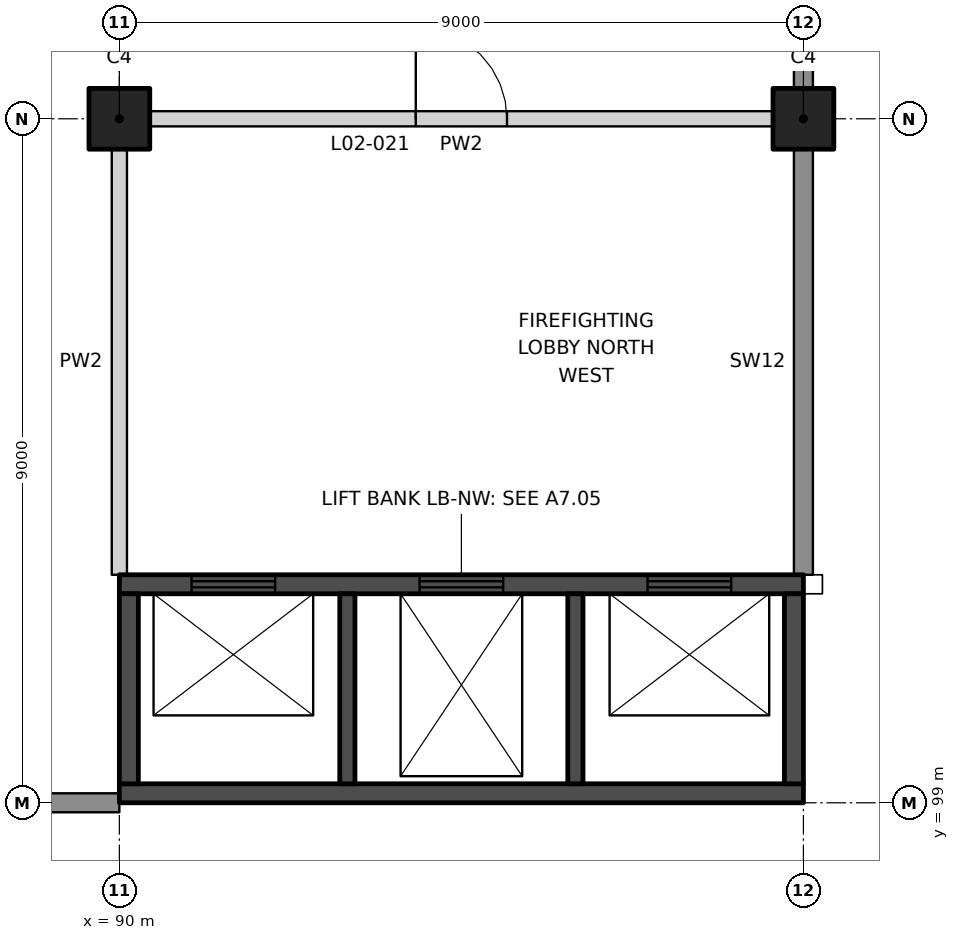
"""IFC4 building model, lengths in metres.
Left out: names, types, materials, properties, quantities, classifications, styles, units other than length and angle.
Written with IfcOpenShell. Run it as: python <this file> out.ifc"""

import sys

from ifc_helpers import new_model, si_unit, direction, frame, frame_2d, origin, origin_2d, place, context, subcontext, project, spatial, rectangle, extrude, element, fill, save


model = new_model("IFC4")
c1 = context("Model", 3, precision=1e-05, world=origin(), true_north=direction((0.0, 1.0)))
c2 = subcontext(c1, "Body", "Model", "MODEL_VIEW")
j1 = project(units=[si_unit("LENGTHUNIT", "METRE"), si_unit("PLANEANGLEUNIT", "RADIAN")], contexts=[c1])
p1 = place(None, origin())
s1 = spatial("IfcSite", under=j1, at=p1, CompositionType="ELEMENT")
p2 = place(p1, origin())
s2 = spatial("IfcBuilding", under=s1, at=p2, CompositionType="ELEMENT")
p3 = place(p2, frame((0.0, 0.0, 11.5)))
s3 = spatial("IfcBuildingStorey", under=s2, at=p3, CompositionType="ELEMENT", Elevation=11.5)
for number, where, z_axis, x_axis in (
    (1, (90.0, 108.0, 0.0), (0.0, 0.0, 1.0), (1.0, 0.0, 0.0)),
    (2, (99.0, 108.0, 0.0), (0.0, 0.0, 1.0), (1.0, 0.0, 0.0)),
):
    element("IfcColumn", number, at=place(p3, frame(where, z_axis=z_axis, x_axis=x_axis)), inside=s3, PredefinedType="COLUMN", context=c2, shape_type="SweptSolid", body=[
        extrude(rectangle(XDim=0.8, YDim=0.8, at=origin_2d()), origin(), (0.0, 0.0, 1.0), 10.5),
    ])
p4 = place(p3, frame((90.4, 108.0, 0.0), z_axis=(0.0, 0.0, 1.0), x_axis=(1.0, 0.0, 0.0)))
e3 = element("IfcWall", 3, at=p4, inside=s3, PredefinedType="PARTITIONING", context=c2, shape_type="SweptSolid", body=[
    extrude(rectangle(XDim=8.2, YDim=0.2, at=frame_2d((4.1, 0.0))), origin(), (0.0, 0.0, 1.0), 9.25),
])
p5 = place(p4, frame((3.5, 0.0, 0.0)))
e4 = element("IfcOpeningElement", 4, at=p5, cuts=e3, PredefinedType="OPENING", context=c2, shape_type="SweptSolid", body=[
    extrude(rectangle(XDim=1.2, YDim=2.1, at=frame_2d((0.6, 1.05))), frame((0.0, 0.11, 0.0), z_axis=(0.0, -1.0, 0.0), x_axis=(1.0, 0.0, 0.0)), (0.0, 0.0, 1.0), 0.22),
])
p6 = place(p3, frame((90.0, 102.0, 0.0), z_axis=(0.0, 0.0, 1.0), x_axis=(0.0, 1.0, 0.0)))
e5 = element("IfcWall", 5, at=p6, inside=s3, PredefinedType="PARTITIONING", context=c2, shape_type="SweptSolid", body=[
    extrude(rectangle(XDim=5.6, YDim=0.2, at=frame_2d((2.8, 0.0))), origin(), (0.0, 0.0, 1.0), 9.45),
])
p7 = place(p3, frame((90.0, 101.875, 0.0), z_axis=(0.0, 0.0, 1.0), x_axis=(1.0, 0.0, 0.0)))
e6 = element("IfcWall", 6, at=p7, inside=s3, PredefinedType="SHEAR", context=c2, shape_type="SweptSolid", body=[
    extrude(rectangle(XDim=9.0, YDim=0.25, at=frame_2d((4.5, 0.0))), origin(), (0.0, 0.0, 1.0), 10.5),
])
p8 = place(p7, frame((0.95, 0.0, 0.0)))
e7 = element("IfcOpeningElement", 7, at=p8, cuts=e6, PredefinedType="OPENING", context=c2, shape_type="SweptSolid", body=[
    extrude(rectangle(XDim=1.1, YDim=2.1, at=frame_2d((0.55, 1.05))), frame((0.0, 0.135, 0.0), z_axis=(0.0, -1.0, 0.0), x_axis=(1.0, 0.0, 0.0)), (0.0, 0.0, 1.0), 0.27),
])
p9 = place(p7, frame((3.95, 0.0, 0.0)))
e8 = element("IfcOpeningElement", 8, at=p9, cuts=e6, PredefinedType="OPENING", context=c2, shape_type="SweptSolid", body=[
    extrude(rectangle(XDim=1.1, YDim=2.1, at=frame_2d((0.55, 1.05))), frame((0.0, 0.135, 0.0), z_axis=(0.0, -1.0, 0.0), x_axis=(1.0, 0.0, 0.0)), (0.0, 0.0, 1.0), 0.27),
])
p10 = place(p7, frame((6.95, 0.0, 0.0)))
e9 = element("IfcOpeningElement", 9, at=p10, cuts=e6, PredefinedType="OPENING", context=c2, shape_type="SweptSolid", body=[
    extrude(rectangle(XDim=1.1, YDim=2.1, at=frame_2d((0.55, 1.05))), frame((0.0, 0.135, 0.0), z_axis=(0.0, -1.0, 0.0), x_axis=(1.0, 0.0, 0.0)), (0.0, 0.0, 1.0), 0.27),
])
p11 = place(p3, frame((90.0, 99.125, 0.0), z_axis=(0.0, 0.0, 1.0), x_axis=(1.0, 0.0, 0.0)))
e10 = element("IfcWall", 10, at=p11, inside=s3, PredefinedType="SHEAR", context=c2, shape_type="SweptSolid", body=[
    extrude(rectangle(XDim=9.0, YDim=0.25, at=frame_2d((4.5, 0.0))), origin(), (0.0, 0.0, 1.0), 10.5),
])
for number, where, z_axis, x_axis in (
    (11, (90.125, 99.25, 0.0), (0.0, 0.0, 1.0), (0.0, 1.0, 0.0)),
    (12, (98.875, 99.25, 0.0), (0.0, 0.0, 1.0), (0.0, 1.0, 0.0)),
):
    element("IfcWall", number, at=place(p3, frame(where, z_axis=z_axis, x_axis=x_axis)), inside=s3, PredefinedType="SHEAR", context=c2, shape_type="SweptSolid", body=[
        extrude(rectangle(XDim=2.5, YDim=0.25, at=frame_2d((1.25, 0.0))), origin(), (0.0, 0.0, 1.0), 10.5),
    ])
for number, where, z_axis, x_axis in (
    (13, (93.0, 99.25, 0.0), (0.0, 0.0, 1.0), (0.0, 1.0, 0.0)),
    (14, (96.0, 99.25, 0.0), (0.0, 0.0, 1.0), (0.0, 1.0, 0.0)),
):
    element("IfcWall", number, at=place(p3, frame(where, z_axis=z_axis, x_axis=x_axis)), inside=s3, PredefinedType="SHEAR", context=c2, shape_type="SweptSolid", body=[
        extrude(rectangle(XDim=2.5, YDim=0.2, at=frame_2d((1.25, 0.0))), origin(), (0.0, 0.0, 1.0), 10.5),
    ])
p12 = place(p3, frame((99.0, 102.0, 0.0), z_axis=(0.0, 0.0, 1.0), x_axis=(0.0, 1.0, 0.0)))
e15 = element("IfcWall", 15, at=p12, inside=s3, PredefinedType="SOLIDWALL", context=c2, shape_type="SweptSolid", body=[
    extrude(rectangle(XDim=5.6, YDim=0.25, at=frame_2d((2.8, 0.0))), origin(), (0.0, 0.0, 1.0), 9.45),
])
p13 = place(p3, frame((99.0, 108.4, 0.0), z_axis=(0.0, 0.0, 1.0), x_axis=(0.0, 1.0, 0.0)))
e16 = element("IfcWall", 16, at=p13, inside=s3, PredefinedType="SOLIDWALL", context=c2, shape_type="SweptSolid", body=[
    extrude(rectangle(XDim=3.1, YDim=0.25, at=frame_2d((1.55, 0.0))), origin(), (0.0, 0.0, 1.0), 9.25),
])
p14 = place(p3, frame((86.5, 99.0, 0.0), z_axis=(0.0, 0.0, 1.0), x_axis=(1.0, 0.0, 0.0)))
e17 = element("IfcWall", 17, at=p14, inside=s3, PredefinedType="SOLIDWALL", context=c2, shape_type="SweptSolid", body=[
    extrude(rectangle(XDim=3.5, YDim=0.25, at=frame_2d((1.75, 0.0))), origin(), (0.0, 0.0, 1.0), 9.15),
])
p15 = place(p5, origin())
e18 = element("IfcDoor", 18, at=p15, inside=s3, OperationType="SINGLE_SWING_LEFT", PredefinedType="DOOR", context=c2, shape_type="SweptSolid", body=[
    extrude(rectangle(XDim=1.2, YDim=2.1, at=frame_2d((0.6, 1.05))), frame((0.0, 0.025, 0.0), z_axis=(0.0, -1.0, 0.0), x_axis=(1.0, 0.0, 0.0)), (0.0, 0.0, 1.0), 0.05),
])
fill(e4, e18)
p16 = place(p8, origin())
e19 = element("IfcDoor", 19, at=p16, inside=s3, OperationType="DOUBLE_DOOR_SLIDING", PredefinedType="DOOR", context=c2, shape_type="SweptSolid", body=[
    extrude(rectangle(XDim=1.1, YDim=2.1, at=frame_2d((0.55, 1.05))), frame((0.0, 0.025, 0.0), z_axis=(0.0, -1.0, 0.0), x_axis=(1.0, 0.0, 0.0)), (0.0, 0.0, 1.0), 0.05),
])
fill(e7, e19)
p17 = place(p9, origin())
e20 = element("IfcDoor", 20, at=p17, inside=s3, OperationType="DOUBLE_DOOR_SLIDING", PredefinedType="DOOR", context=c2, shape_type="SweptSolid", body=[
    extrude(rectangle(XDim=1.1, YDim=2.1, at=frame_2d((0.55, 1.05))), frame((0.0, 0.025, 0.0), z_axis=(0.0, -1.0, 0.0), x_axis=(1.0, 0.0, 0.0)), (0.0, 0.0, 1.0), 0.05),
])
fill(e8, e20)
p18 = place(p10, origin())
e21 = element("IfcDoor", 21, at=p18, inside=s3, OperationType="DOUBLE_DOOR_SLIDING", PredefinedType="DOOR", context=c2, shape_type="SweptSolid", body=[
    extrude(rectangle(XDim=1.1, YDim=2.1, at=frame_2d((0.55, 1.05))), frame((0.0, 0.025, 0.0), z_axis=(0.0, -1.0, 0.0), x_axis=(1.0, 0.0, 0.0)), (0.0, 0.0, 1.0), 0.05),
])
fill(e9, e21)
save(model, sys.argv[1])
